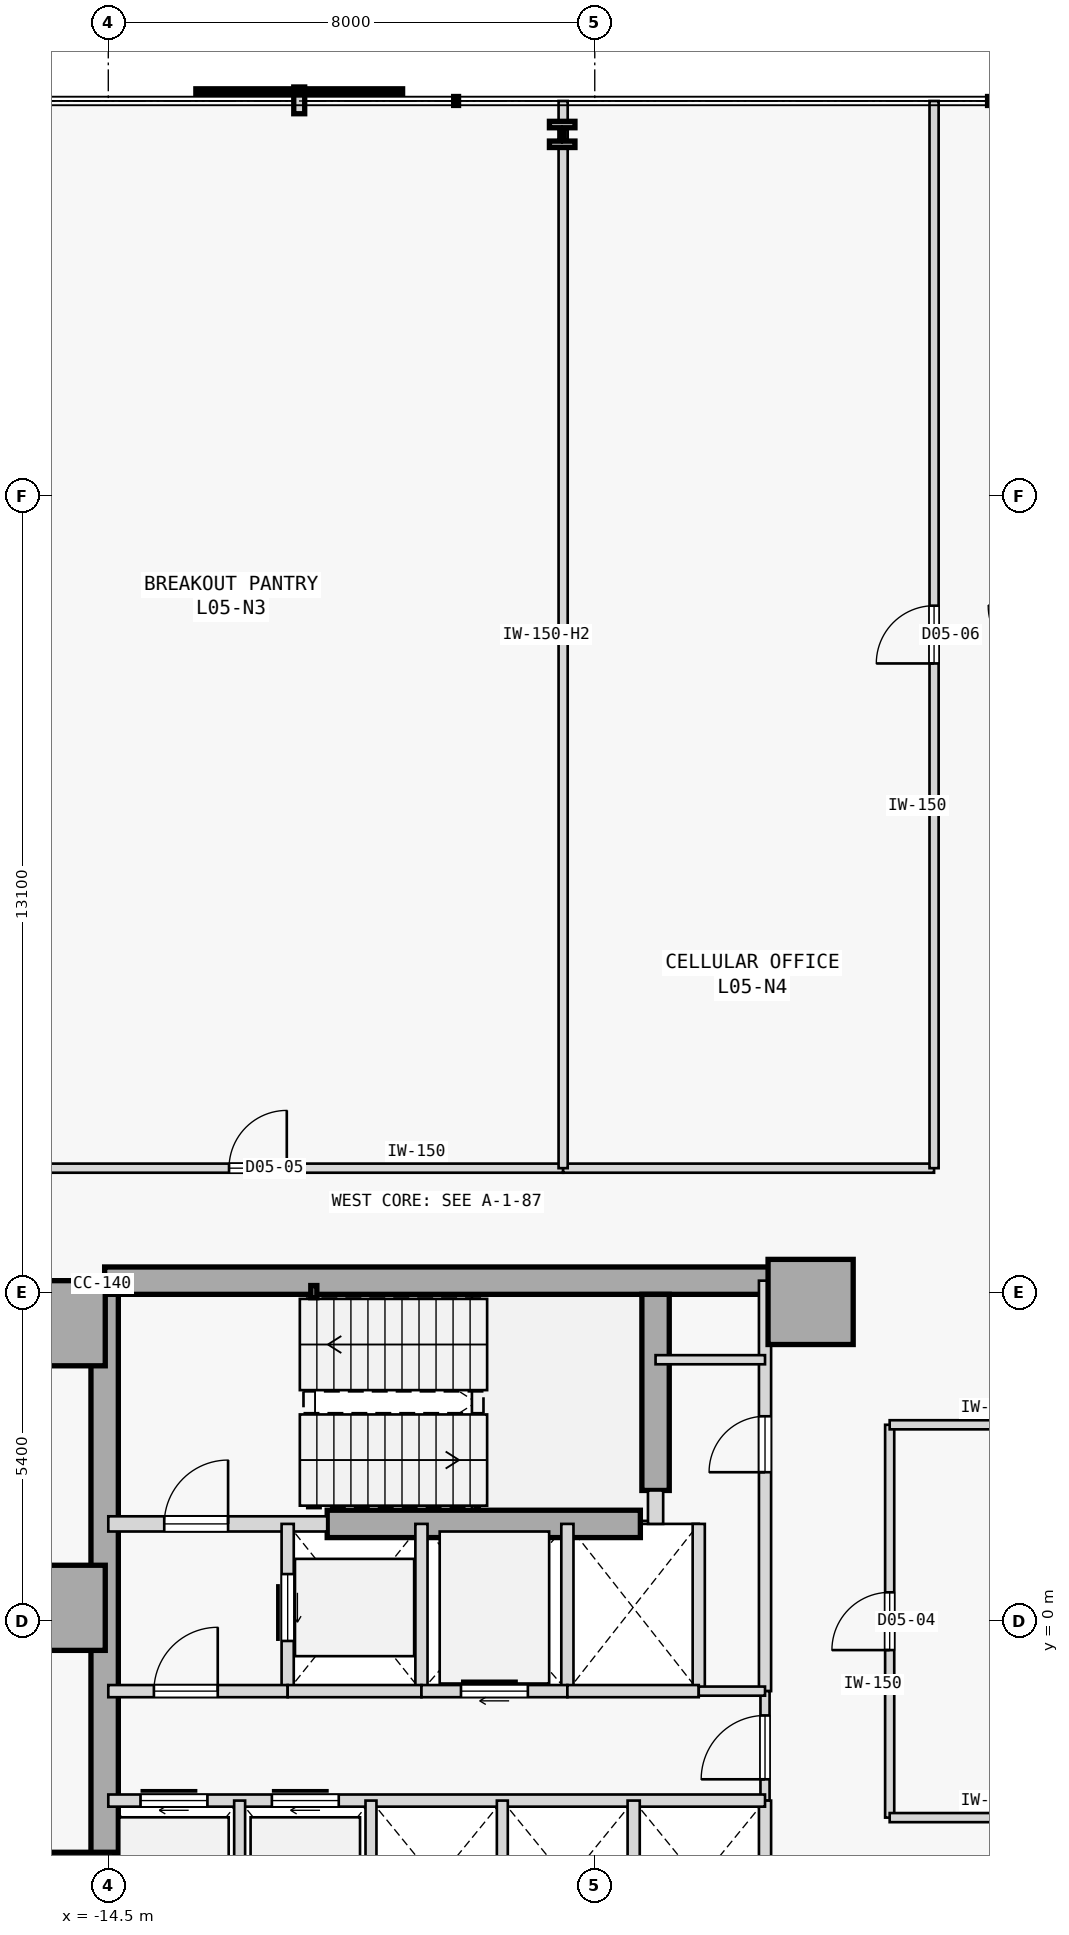
"""IFC4 building model, lengths in metres.
Left out: names, types, materials, properties, quantities, classifications, styles, units other than length and angle.
Written with IfcOpenShell. Run it as: python <this file> out.ifc"""

import sys

from ifc_helpers import new_model, si_unit, direction, frame, frame_2d, origin, origin_2d, place, context, subcontext, project, spatial, rectangle, hollow_rectangle, i_section, extrude, element, fill, save


model = new_model("IFC4")
c1 = context("Model", 3, precision=1e-05, world=origin(), true_north=direction((0.0, 1.0)))
c2 = subcontext(c1, "Body", "Model", "MODEL_VIEW")
j1 = project(units=[si_unit("LENGTHUNIT", "METRE"), si_unit("PLANEANGLEUNIT", "RADIAN")], contexts=[c1])
p1 = place(None, origin())
s1 = spatial("IfcSite", under=j1, at=p1, CompositionType="ELEMENT")
p2 = place(p1, origin())
s2 = spatial("IfcBuilding", under=s1, at=p2, CompositionType="ELEMENT")
p3 = place(p2, frame((0.0, 0.0, 25.6)))
s3 = spatial("IfcBuildingStorey", under=s2, at=p3, CompositionType="ELEMENT", Elevation=25.6)
for number, where, z_axis, x_axis in (
    (1, (-15.25, 4.9, 0.0), (0.0, 0.0, 1.0), (1.0, 0.0, 0.0)),
    (2, (-15.25, 0.22, 0.0), (0.0, 0.0, 1.0), (1.0, 0.0, 0.0)),
    (3, (-15.08, -4.5, 0.0), (0.0, 0.0, 1.0), (1.0, 0.0, 0.0)),
    (4, (-2.95, 5.25, 0.0), (0.0, 0.0, 1.0), (1.0, 0.0, 0.0)),
):
    element("IfcColumn", number, at=place(p3, frame(where, z_axis=z_axis, x_axis=x_axis)), inside=s3, PredefinedType="COLUMN", context=c2, shape_type="SweptSolid", body=[
        extrude(rectangle(XDim=1.4, YDim=1.4, at=origin_2d()), origin(), (0.0, 0.0, 1.0), 3.8),
    ])
p4 = place(p3, frame((-14.56, 5.6, 0.0), z_axis=(0.0, 0.0, 1.0), x_axis=(1.0, 0.0, 0.0)))
e5 = element("IfcWall", 5, at=p4, inside=s3, PredefinedType="SHEAR", context=c2, shape_type="SweptSolid", body=[
    extrude(rectangle(XDim=11.41, YDim=0.45, at=frame_2d((5.705, 0.0))), origin(), (0.0, 0.0, 1.0), 3.575),
])
p5 = place(p3, frame((-14.56, -5.375, 0.0), z_axis=(0.0, 0.0, 1.0), x_axis=(0.0, 1.0, 0.0)))
e6 = element("IfcWall", 6, at=p5, inside=s3, PredefinedType="SHEAR", context=c2, shape_type="SweptSolid", body=[
    extrude(rectangle(XDim=10.75, YDim=0.45, at=frame_2d((5.375, 0.0))), origin(), (0.0, 0.0, 1.0), 3.575),
])
p6 = place(p3, frame((-5.5, 2.15, 0.0), z_axis=(0.0, 0.0, 1.0), x_axis=(0.0, 1.0, 0.0)))
e7 = element("IfcWall", 7, at=p6, inside=s3, PredefinedType="SHEAR", context=c2, shape_type="SweptSolid", body=[
    extrude(rectangle(XDim=3.225, YDim=0.45, at=frame_2d((1.613, 0.0))), origin(), (0.0, 0.0, 1.0), 3.575),
])
p7 = place(p3, frame((-10.9, 1.6, 0.0), z_axis=(0.0, 0.0, 1.0), x_axis=(1.0, 0.0, 0.0)))
e8 = element("IfcWall", 8, at=p7, inside=s3, PredefinedType="SHEAR", context=c2, shape_type="SweptSolid", body=[
    extrude(rectangle(XDim=5.15, YDim=0.45, at=frame_2d((2.575, 0.0))), origin(), (0.0, 0.0, 1.0), 3.575),
])
p8 = place(p3, frame((-11.12, 5.42, 0.0), z_axis=(0.0, 0.0, 1.0), x_axis=(1.0, 0.0, 0.0)))
e9 = element("IfcColumn", 9, at=p8, inside=s3, PredefinedType="COLUMN", context=c2, shape_type="SweptSolid", body=[
    extrude(hollow_rectangle(XDim=0.1, YDim=0.2, WallThickness=0.008, at=origin_2d()), origin(), (0.0, 0.0, 1.0), 3.8),
])
p9 = place(p3, frame((-7.036, 24.45, 0.0), z_axis=(0.0, 0.0, 1.0), x_axis=(1.0, 0.0, 0.0)))
e10 = element("IfcColumn", 10, at=p9, inside=s3, PredefinedType="COLUMN", context=c2, shape_type="SweptSolid", body=[
    extrude(i_section(OverallWidth=0.42, OverallDepth=0.431, WebThickness=0.065, FlangeThickness=0.106, FilletRadius=0.015, at=origin_2d()), origin(), (0.0, 0.0, 1.0), 3.8),
])
p10 = place(p3, frame((-14.5, 1.6, 0.0), z_axis=(0.0, 0.0, 1.0), x_axis=(1.0, 0.0, 0.0)))
e11 = element("IfcWall", 11, at=p10, inside=s3, PredefinedType="STANDARD", context=c2, shape_type="SweptSolid", body=[
    extrude(rectangle(XDim=3.6, YDim=0.25, at=frame_2d((1.8, 0.0))), origin(), (0.0, 0.0, 1.0), 3.575),
])
p11 = place(p10, frame((0.92, 0.0, 0.0)))
e12 = element("IfcOpeningElement", 12, at=p11, cuts=e11, PredefinedType="OPENING", context=c2, shape_type="SweptSolid", body=[
    extrude(rectangle(XDim=1.05, YDim=2.15, at=frame_2d((0.525, 1.075))), frame((0.0, 0.135, 0.0), z_axis=(0.0, -1.0, 0.0), x_axis=(1.0, 0.0, 0.0)), (0.0, 0.0, 1.0), 0.27),
])
p12 = place(p3, frame((-5.5, 1.6, 0.0), z_axis=(0.0, 0.0, 1.0), x_axis=(0.0, 1.0, 0.0)))
e13 = element("IfcWall", 13, at=p12, inside=s3, PredefinedType="STANDARD", context=c2, shape_type="SweptSolid", body=[
    extrude(rectangle(XDim=0.55, YDim=0.25, at=frame_2d((0.275, 0.0))), origin(), (0.0, 0.0, 1.0), 3.575),
])
p13 = place(p3, frame((-3.7, -1.15, 0.0), z_axis=(0.0, 0.0, 1.0), x_axis=(0.0, 1.0, 0.0)))
e14 = element("IfcWall", 14, at=p13, inside=s3, PredefinedType="STANDARD", context=c2, shape_type="SweptSolid", body=[
    extrude(rectangle(XDim=6.75, YDim=0.2, at=frame_2d((3.375, 0.0))), origin(), (0.0, 0.0, 1.0), 3.575),
])
p14 = place(p13, frame((3.6, 0.0, 0.0)))
e15 = element("IfcOpeningElement", 15, at=p14, cuts=e14, PredefinedType="OPENING", context=c2, shape_type="SweptSolid", body=[
    extrude(rectangle(XDim=0.92, YDim=2.15, at=frame_2d((0.46, 1.075))), frame((0.0, 0.11, 0.0), z_axis=(0.0, -1.0, 0.0), x_axis=(1.0, 0.0, 0.0)), (0.0, 0.0, 1.0), 0.22),
])
p15 = place(p3, frame((-3.7, -2.95, 0.0), z_axis=(0.0, 0.0, 1.0), x_axis=(0.0, 1.0, 0.0)))
e16 = element("IfcWall", 16, at=p15, inside=s3, PredefinedType="PARTITIONING", context=c2, shape_type="SweptSolid", body=[
    extrude(rectangle(XDim=1.8, YDim=0.15, at=frame_2d((0.9, 0.0))), origin(), (0.0, 0.0, 1.0), 3.575),
])
p16 = place(p15, frame((0.35, 0.0, 0.0)))
e17 = element("IfcOpeningElement", 17, at=p16, cuts=e16, PredefinedType="OPENING", context=c2, shape_type="SweptSolid", body=[
    extrude(rectangle(XDim=1.05, YDim=2.18, at=frame_2d((0.525, 1.09))), frame((0.0, 0.085, 0.0), z_axis=(0.0, -1.0, 0.0), x_axis=(1.0, 0.0, 0.0)), (0.0, 0.0, 1.0), 0.17),
])
p17 = place(p3, frame((-3.7, -5.6, 0.0), z_axis=(0.0, 0.0, 1.0), x_axis=(0.0, 1.0, 0.0)))
e18 = element("IfcWall", 18, at=p17, inside=s3, PredefinedType="STANDARD", context=c2, shape_type="SweptSolid", body=[
    extrude(rectangle(XDim=2.65, YDim=0.2, at=frame_2d((1.325, 0.0))), origin(), (0.0, 0.0, 1.0), 3.575),
])
p18 = place(p3, frame((-11.55, -1.15, 0.0), z_axis=(0.0, 0.0, 1.0), x_axis=(0.0, 1.0, 0.0)))
e19 = element("IfcWall", 19, at=p18, inside=s3, PredefinedType="STANDARD", context=c2, shape_type="SweptSolid", body=[
    extrude(rectangle(XDim=2.75, YDim=0.2, at=frame_2d((1.375, 0.0))), origin(), (0.0, 0.0, 1.0), 3.575),
])
p19 = place(p18, frame((0.825, 0.0, 0.0)))
e20 = element("IfcOpeningElement", 20, at=p19, cuts=e19, PredefinedType="OPENING", context=c2, shape_type="SweptSolid", body=[
    extrude(rectangle(XDim=1.1, YDim=2.15, at=frame_2d((0.55, 1.075))), frame((0.0, 0.11, 0.0), z_axis=(0.0, -1.0, 0.0), x_axis=(1.0, 0.0, 0.0)), (0.0, 0.0, 1.0), 0.22),
])
p20 = place(p3, frame((-9.35, -1.15, 0.0), z_axis=(0.0, 0.0, 1.0), x_axis=(0.0, 1.0, 0.0)))
e21 = element("IfcWall", 21, at=p20, inside=s3, PredefinedType="STANDARD", context=c2, shape_type="SweptSolid", body=[
    extrude(rectangle(XDim=2.75, YDim=0.2, at=frame_2d((1.375, 0.0))), origin(), (0.0, 0.0, 1.0), 3.575),
])
p21 = place(p3, frame((-14.5, -1.15, 0.0), z_axis=(0.0, 0.0, 1.0), x_axis=(1.0, 0.0, 0.0)))
e22 = element("IfcWall", 22, at=p21, inside=s3, PredefinedType="STANDARD", context=c2, shape_type="SweptSolid", body=[
    extrude(rectangle(XDim=2.95, YDim=0.2, at=frame_2d((1.475, 0.0))), origin(), (0.0, 0.0, 1.0), 3.575),
])
p22 = place(p21, frame((0.75, 0.0, 0.0)))
e23 = element("IfcOpeningElement", 23, at=p22, cuts=e22, PredefinedType="OPENING", context=c2, shape_type="SweptSolid", body=[
    extrude(rectangle(XDim=1.05, YDim=2.18, at=frame_2d((0.525, 1.09))), frame((0.0, 0.11, 0.0), z_axis=(0.0, -1.0, 0.0), x_axis=(1.0, 0.0, 0.0)), (0.0, 0.0, 1.0), 0.22),
])
p23 = place(p3, frame((-11.55, -1.15, 0.0), z_axis=(0.0, 0.0, 1.0), x_axis=(1.0, 0.0, 0.0)))
e24 = element("IfcWall", 24, at=p23, inside=s3, PredefinedType="STANDARD", context=c2, shape_type="SweptSolid", body=[
    extrude(rectangle(XDim=2.2, YDim=0.2, at=frame_2d((1.1, 0.0))), origin(), (0.0, 0.0, 1.0), 3.575),
])
p24 = place(p3, frame((-6.95, -1.15, 0.0), z_axis=(0.0, 0.0, 1.0), x_axis=(0.0, 1.0, 0.0)))
e25 = element("IfcWall", 25, at=p24, inside=s3, PredefinedType="STANDARD", context=c2, shape_type="SweptSolid", body=[
    extrude(rectangle(XDim=2.75, YDim=0.2, at=frame_2d((1.375, 0.0))), origin(), (0.0, 0.0, 1.0), 3.575),
])
p25 = place(p3, frame((-9.35, -1.15, 0.0), z_axis=(0.0, 0.0, 1.0), x_axis=(1.0, 0.0, 0.0)))
e26 = element("IfcWall", 26, at=p25, inside=s3, PredefinedType="STANDARD", context=c2, shape_type="SweptSolid", body=[
    extrude(rectangle(XDim=2.4, YDim=0.2, at=frame_2d((1.2, 0.0))), origin(), (0.0, 0.0, 1.0), 3.575),
])
p26 = place(p25, frame((0.65, 0.0, 0.0)))
e27 = element("IfcOpeningElement", 27, at=p26, cuts=e26, PredefinedType="OPENING", context=c2, shape_type="SweptSolid", body=[
    extrude(rectangle(XDim=1.1, YDim=2.15, at=frame_2d((0.55, 1.075))), frame((0.0, 0.11, 0.0), z_axis=(0.0, -1.0, 0.0), x_axis=(1.0, 0.0, 0.0)), (0.0, 0.0, 1.0), 0.22),
])
p27 = place(p3, frame((-4.79, -1.15, 0.0), z_axis=(0.0, 0.0, 1.0), x_axis=(0.0, 1.0, 0.0)))
e28 = element("IfcWall", 28, at=p27, inside=s3, PredefinedType="STANDARD", context=c2, shape_type="SweptSolid", body=[
    extrude(rectangle(XDim=2.75, YDim=0.2, at=frame_2d((1.375, 0.0))), origin(), (0.0, 0.0, 1.0), 3.575),
])
p28 = place(p3, frame((-6.95, -1.15, 0.0), z_axis=(0.0, 0.0, 1.0), x_axis=(1.0, 0.0, 0.0)))
e29 = element("IfcWall", 29, at=p28, inside=s3, PredefinedType="STANDARD", context=c2, shape_type="SweptSolid", body=[
    extrude(rectangle(XDim=2.16, YDim=0.2, at=frame_2d((1.08, 0.0))), origin(), (0.0, 0.0, 1.0), 3.575),
])
p29 = place(p3, frame((-4.79, -1.15, 0.0), z_axis=(0.0, 0.0, 1.0), x_axis=(1.0, 0.0, 0.0)))
e30 = element("IfcWall", 30, at=p29, inside=s3, PredefinedType="PARTITIONING", context=c2, shape_type="SweptSolid", body=[
    extrude(rectangle(XDim=1.09, YDim=0.15, at=frame_2d((0.545, 0.0))), origin(), (0.0, 0.0, 1.0), 3.575),
])
p30 = place(p3, frame((-14.5, -2.95, 0.0), z_axis=(0.0, 0.0, 1.0), x_axis=(1.0, 0.0, 0.0)))
e31 = element("IfcWall", 31, at=p30, inside=s3, PredefinedType="STANDARD", context=c2, shape_type="SweptSolid", body=[
    extrude(rectangle(XDim=10.8, YDim=0.2, at=frame_2d((5.4, 0.0))), origin(), (0.0, 0.0, 1.0), 3.575),
])
p31 = place(p30, frame((0.53, 0.0, 0.0)))
e32 = element("IfcOpeningElement", 32, at=p31, cuts=e31, PredefinedType="OPENING", context=c2, shape_type="SweptSolid", body=[
    extrude(rectangle(XDim=1.1, YDim=2.15, at=frame_2d((0.55, 1.075))), frame((0.0, 0.11, 0.0), z_axis=(0.0, -1.0, 0.0), x_axis=(1.0, 0.0, 0.0)), (0.0, 0.0, 1.0), 0.22),
])
p32 = place(p30, frame((2.69, 0.0, 0.0)))
e33 = element("IfcOpeningElement", 33, at=p32, cuts=e31, PredefinedType="OPENING", context=c2, shape_type="SweptSolid", body=[
    extrude(rectangle(XDim=1.1, YDim=2.15, at=frame_2d((0.55, 1.075))), frame((0.0, 0.11, 0.0), z_axis=(0.0, -1.0, 0.0), x_axis=(1.0, 0.0, 0.0)), (0.0, 0.0, 1.0), 0.22),
])
p33 = place(p3, frame((-5.86, -5.6, 0.0), z_axis=(0.0, 0.0, 1.0), x_axis=(0.0, 1.0, 0.0)))
e34 = element("IfcWall", 34, at=p33, inside=s3, PredefinedType="STANDARD", context=c2, shape_type="SweptSolid", body=[
    extrude(rectangle(XDim=2.65, YDim=0.2, at=frame_2d((1.325, 0.0))), origin(), (0.0, 0.0, 1.0), 3.575),
])
for number, where, z_axis, x_axis in (
    (35, (-12.34, -5.6, 0.0), (0.0, 0.0, 1.0), (0.0, 1.0, 0.0)),
    (36, (-10.18, -5.6, 0.0), (0.0, 0.0, 1.0), (0.0, 1.0, 0.0)),
    (37, (-8.02, -5.6, 0.0), (0.0, 0.0, 1.0), (0.0, 1.0, 0.0)),
):
    element("IfcWall", number, at=place(p3, frame(where, z_axis=z_axis, x_axis=x_axis)), inside=s3, PredefinedType="STANDARD", context=c2, shape_type="SweptSolid", body=[
        extrude(rectangle(XDim=2.65, YDim=0.18, at=frame_2d((1.325, 0.0))), origin(), (0.0, 0.0, 1.0), 3.575),
    ])
p34 = place(p3, frame((-5.5, 4.3, 0.0), z_axis=(0.0, 0.0, 1.0), x_axis=(1.0, 0.0, 0.0)))
e38 = element("IfcWall", 38, at=p34, inside=s3, PredefinedType="PARTITIONING", context=c2, shape_type="SweptSolid", body=[
    extrude(rectangle(XDim=1.8, YDim=0.15, at=frame_2d((0.9, 0.0))), origin(), (0.0, 0.0, 1.0), 3.575),
])
p35 = place(p3, frame((-1.65, -3.23, 0.0), z_axis=(0.0, 0.0, 1.0), x_axis=(0.0, 1.0, 0.0)))
e39 = element("IfcWall", 39, at=p35, inside=s3, PredefinedType="PARTITIONING", context=c2, shape_type="SweptSolid", body=[
    extrude(rectangle(XDim=6.46, YDim=0.15, at=frame_2d((3.23, 0.0))), origin(), (0.0, 0.0, 1.0), 3.575),
])
p36 = place(p35, frame((2.755, 0.0, 0.0)))
e40 = element("IfcOpeningElement", 40, at=p36, cuts=e39, PredefinedType="OPENING", context=c2, shape_type="SweptSolid", body=[
    extrude(rectangle(XDim=0.95, YDim=2.15, at=frame_2d((0.475, 1.075))), frame((0.0, 0.085, 0.0), z_axis=(0.0, -1.0, 0.0), x_axis=(1.0, 0.0, 0.0)), (0.0, 0.0, 1.0), 0.17),
])
for number, where, z_axis, x_axis in (
    (41, (-1.65, -3.23, 0.0), (0.0, 0.0, 1.0), (1.0, 0.0, 0.0)),
    (42, (-1.65, 3.23, 0.0), (0.0, 0.0, 1.0), (1.0, 0.0, 0.0)),
):
    element("IfcWall", number, at=place(p3, frame(where, z_axis=z_axis, x_axis=x_axis)), inside=s3, PredefinedType="PARTITIONING", context=c2, shape_type="SweptSolid", body=[
        extrude(rectangle(XDim=3.3, YDim=0.15, at=frame_2d((1.65, 0.0))), origin(), (0.0, 0.0, 1.0), 3.575),
    ])
p37 = place(p3, frame((-17.059, 7.45, 0.0), z_axis=(0.0, 0.0, 1.0), x_axis=(1.0, 0.0, 0.0)))
e43 = element("IfcWall", 43, at=p37, inside=s3, PredefinedType="PARTITIONING", context=c2, shape_type="SweptSolid", body=[
    extrude(rectangle(XDim=10.039, YDim=0.15, at=frame_2d((5.02, 0.0))), origin(), (0.0, 0.0, 1.0), 3.575),
])
p38 = place(p37, frame((4.544, 0.0, 0.0)))
e44 = element("IfcOpeningElement", 44, at=p38, cuts=e43, PredefinedType="OPENING", context=c2, shape_type="SweptSolid", body=[
    extrude(rectangle(XDim=0.95, YDim=2.15, at=frame_2d((0.475, 1.075))), frame((0.0, 0.085, 0.0), z_axis=(0.0, -1.0, 0.0), x_axis=(1.0, 0.0, 0.0)), (0.0, 0.0, 1.0), 0.17),
])
p39 = place(p3, frame((-7.02, 7.45, 0.0), z_axis=(0.0, 0.0, 1.0), x_axis=(1.0, 0.0, 0.0)))
e45 = element("IfcWall", 45, at=p39, inside=s3, PredefinedType="PARTITIONING", context=c2, shape_type="SweptSolid", body=[
    extrude(rectangle(XDim=6.1, YDim=0.15, at=frame_2d((3.05, 0.0))), origin(), (0.0, 0.0, 1.0), 3.575),
])
p40 = place(p3, frame((-0.92, 7.45, 0.0), z_axis=(0.0, 0.0, 1.0), x_axis=(0.0, 1.0, 0.0)))
e46 = element("IfcWall", 46, at=p40, inside=s3, PredefinedType="PARTITIONING", context=c2, shape_type="SweptSolid", body=[
    extrude(rectangle(XDim=17.55, YDim=0.15, at=frame_2d((8.775, 0.0))), origin(), (0.0, 0.0, 1.0), 3.575),
])
p41 = place(p40, frame((8.3, 0.0, 0.0)))
e47 = element("IfcOpeningElement", 47, at=p41, cuts=e46, PredefinedType="OPENING", context=c2, shape_type="SweptSolid", body=[
    extrude(rectangle(XDim=0.95, YDim=2.15, at=frame_2d((0.475, 1.075))), frame((0.0, 0.085, 0.0), z_axis=(0.0, -1.0, 0.0), x_axis=(1.0, 0.0, 0.0)), (0.0, 0.0, 1.0), 0.17),
])
p42 = place(p3, frame((-7.02, 7.45, 0.0), z_axis=(0.0, 0.0, 1.0), x_axis=(0.0, 1.0, 0.0)))
e48 = element("IfcWall", 48, at=p42, inside=s3, PredefinedType="PARTITIONING", context=c2, shape_type="SweptSolid", body=[
    extrude(rectangle(XDim=17.55, YDim=0.15, at=frame_2d((8.775, 0.0))), origin(), (0.0, 0.0, 1.0), 2.975),
])
p43 = place(p11, origin())
e49 = element("IfcDoor", 49, at=p43, inside=s3, OperationType="SINGLE_SWING_RIGHT", PredefinedType="DOOR", context=c2, shape_type="SweptSolid", body=[
    extrude(rectangle(XDim=1.05, YDim=2.15, at=frame_2d((0.525, 1.075))), frame((0.0, 0.025, 0.0), z_axis=(0.0, -1.0, 0.0), x_axis=(1.0, 0.0, 0.0)), (0.0, 0.0, 1.0), 0.05),
])
fill(e12, e49)
p44 = place(p22, origin())
e50 = element("IfcDoor", 50, at=p44, inside=s3, OperationType="SINGLE_SWING_RIGHT", PredefinedType="DOOR", context=c2, shape_type="SweptSolid", body=[
    extrude(rectangle(XDim=1.05, YDim=2.18, at=frame_2d((0.525, 1.09))), frame((0.0, 0.025, 0.0), z_axis=(0.0, -1.0, 0.0), x_axis=(1.0, 0.0, 0.0)), (0.0, 0.0, 1.0), 0.05),
])
fill(e23, e50)
p45 = place(p16, origin())
e51 = element("IfcDoor", 51, at=p45, inside=s3, OperationType="SINGLE_SWING_LEFT", PredefinedType="DOOR", context=c2, shape_type="SweptSolid", body=[
    extrude(rectangle(XDim=1.05, YDim=2.18, at=frame_2d((0.525, 1.09))), frame((0.0, 0.025, 0.0), z_axis=(0.0, -1.0, 0.0), x_axis=(1.0, 0.0, 0.0)), (0.0, 0.0, 1.0), 0.05),
])
fill(e17, e51)
p46 = place(p19, origin())
e52 = element("IfcDoor", 52, at=p46, inside=s3, OperationType="SLIDING_TO_RIGHT", PredefinedType="DOOR", context=c2, shape_type="SweptSolid", body=[
    extrude(rectangle(XDim=1.1, YDim=2.15, at=frame_2d((0.55, 1.075))), frame((0.0, 0.025, 0.0), z_axis=(0.0, -1.0, 0.0), x_axis=(1.0, 0.0, 0.0)), (0.0, 0.0, 1.0), 0.05),
])
fill(e20, e52)
p47 = place(p26, origin())
e53 = element("IfcDoor", 53, at=p47, inside=s3, OperationType="SLIDING_TO_RIGHT", PredefinedType="DOOR", context=c2, shape_type="SweptSolid", body=[
    extrude(rectangle(XDim=1.1, YDim=2.15, at=frame_2d((0.55, 1.075))), frame((0.0, 0.025, 0.0), z_axis=(0.0, -1.0, 0.0), x_axis=(1.0, 0.0, 0.0)), (0.0, 0.0, 1.0), 0.05),
])
fill(e27, e53)
p48 = place(p31, origin())
e54 = element("IfcDoor", 54, at=p48, inside=s3, OperationType="SLIDING_TO_RIGHT", PredefinedType="DOOR", context=c2, shape_type="SweptSolid", body=[
    extrude(rectangle(XDim=1.1, YDim=2.15, at=frame_2d((0.55, 1.075))), frame((0.0, 0.025, 0.0), z_axis=(0.0, -1.0, 0.0), x_axis=(1.0, 0.0, 0.0)), (0.0, 0.0, 1.0), 0.05),
])
fill(e32, e54)
p49 = place(p32, origin())
e55 = element("IfcDoor", 55, at=p49, inside=s3, OperationType="SLIDING_TO_RIGHT", PredefinedType="DOOR", context=c2, shape_type="SweptSolid", body=[
    extrude(rectangle(XDim=1.1, YDim=2.15, at=frame_2d((0.55, 1.075))), frame((0.0, 0.025, 0.0), z_axis=(0.0, -1.0, 0.0), x_axis=(1.0, 0.0, 0.0)), (0.0, 0.0, 1.0), 0.05),
])
fill(e33, e55)
p50 = place(p14, origin())
e56 = element("IfcDoor", 56, at=p50, inside=s3, OperationType="SINGLE_SWING_LEFT", PredefinedType="DOOR", context=c2, shape_type="SweptSolid", body=[
    extrude(rectangle(XDim=0.92, YDim=2.15, at=frame_2d((0.46, 1.075))), frame((0.0, 0.025, 0.0), z_axis=(0.0, -1.0, 0.0), x_axis=(1.0, 0.0, 0.0)), (0.0, 0.0, 1.0), 0.05),
])
fill(e15, e56)
p51 = place(p36, origin())
e57 = element("IfcDoor", 57, at=p51, inside=s3, OperationType="SINGLE_SWING_LEFT", PredefinedType="DOOR", context=c2, shape_type="SweptSolid", body=[
    extrude(rectangle(XDim=0.95, YDim=2.15, at=frame_2d((0.475, 1.075))), frame((0.0, 0.025, 0.0), z_axis=(0.0, -1.0, 0.0), x_axis=(1.0, 0.0, 0.0)), (0.0, 0.0, 1.0), 0.05),
])
fill(e40, e57)
p52 = place(p38, origin())
e58 = element("IfcDoor", 58, at=p52, inside=s3, OperationType="SINGLE_SWING_RIGHT", PredefinedType="DOOR", context=c2, shape_type="SweptSolid", body=[
    extrude(rectangle(XDim=0.95, YDim=2.15, at=frame_2d((0.475, 1.075))), frame((0.0, 0.025, 0.0), z_axis=(0.0, -1.0, 0.0), x_axis=(1.0, 0.0, 0.0)), (0.0, 0.0, 1.0), 0.05),
])
fill(e44, e58)
p53 = place(p41, origin())
e59 = element("IfcDoor", 59, at=p53, inside=s3, OperationType="SINGLE_SWING_LEFT", PredefinedType="DOOR", context=c2, shape_type="SweptSolid", body=[
    extrude(rectangle(XDim=0.95, YDim=2.15, at=frame_2d((0.475, 1.075))), frame((0.0, 0.025, 0.0), z_axis=(0.0, -1.0, 0.0), x_axis=(1.0, 0.0, 0.0)), (0.0, 0.0, 1.0), 0.05),
])
fill(e47, e59)
save(model, sys.argv[1])
